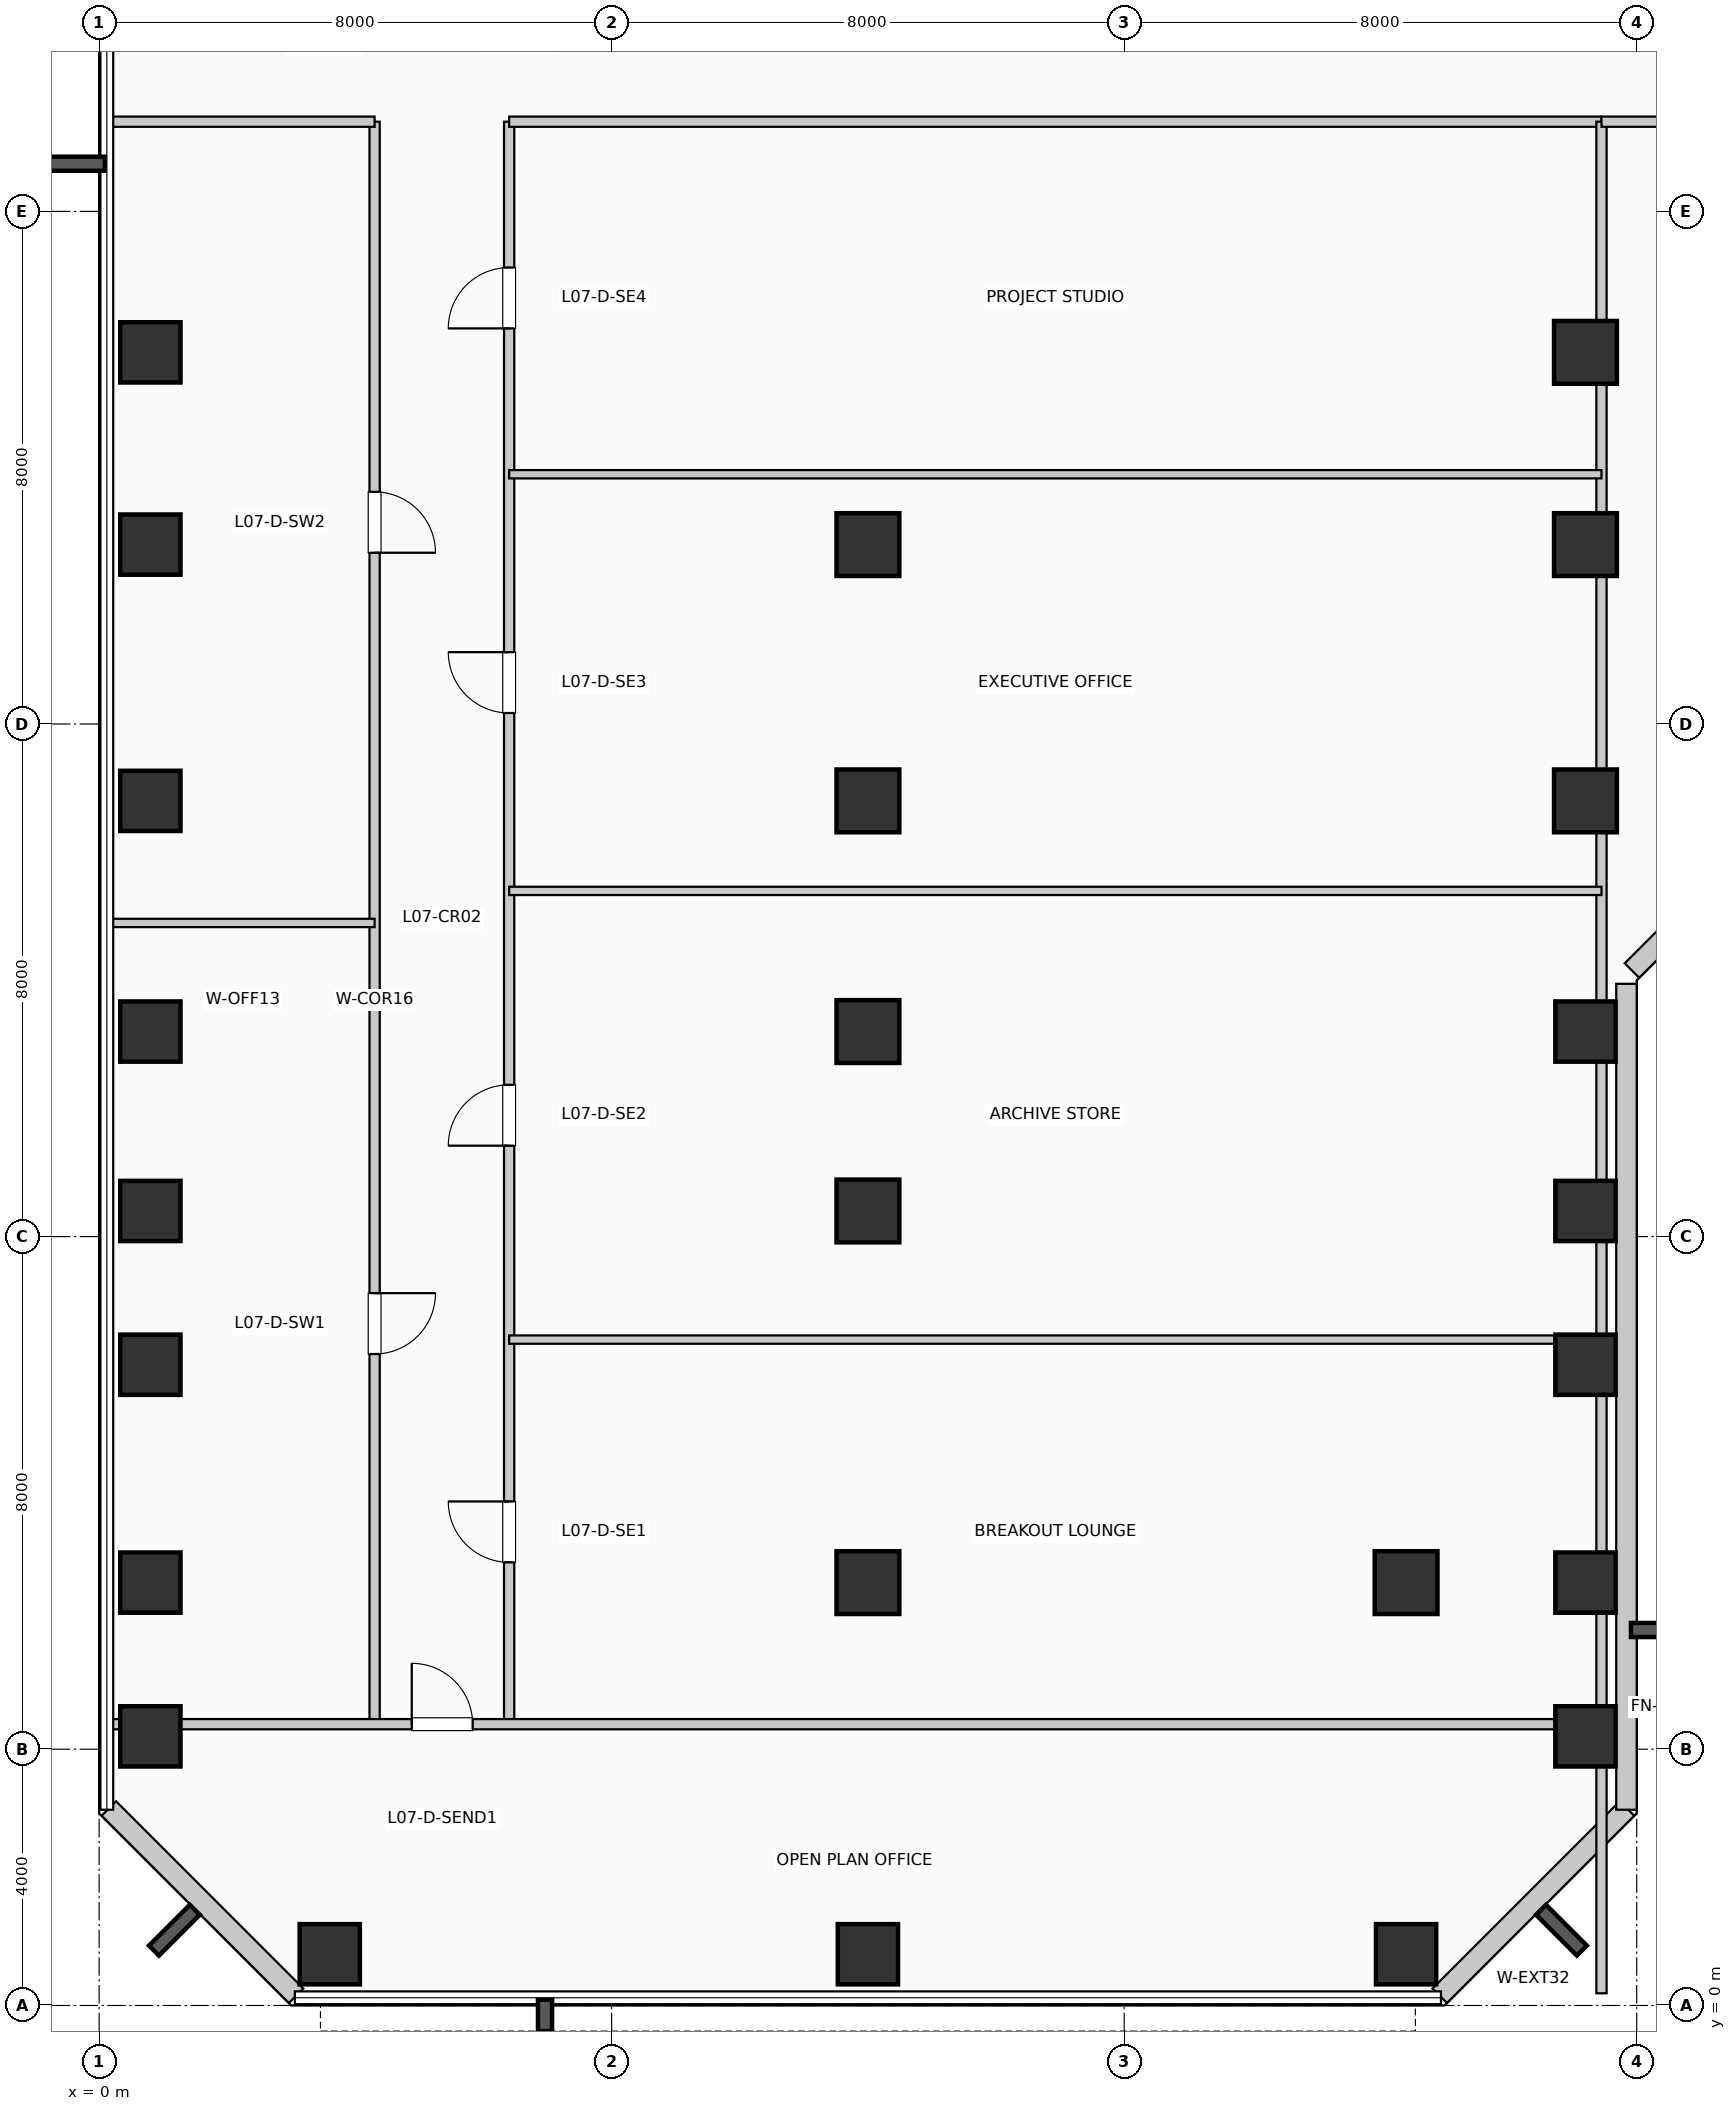
"""IFC4 building model, lengths in metres.
Left out: names, types, materials, properties, quantities, classifications, styles, units other than length and angle.
Written with IfcOpenShell. Run it as: python <this file> out.ifc"""

import sys

from ifc_helpers import new_model, si_unit, direction, frame, frame_2d, origin, origin_2d, place, context, subcontext, project, spatial, rectangle, extrude, element, fill, save


model = new_model("IFC4")
c1 = context("Model", 3, precision=1e-05, world=origin(), true_north=direction((0.0, 1.0)))
c2 = subcontext(c1, "Body", "Model", "MODEL_VIEW")
j1 = project(units=[si_unit("LENGTHUNIT", "METRE"), si_unit("PLANEANGLEUNIT", "RADIAN")], contexts=[c1])
p1 = place(None, origin())
s1 = spatial("IfcSite", under=j1, at=p1, CompositionType="ELEMENT")
p2 = place(p1, origin())
s2 = spatial("IfcBuilding", under=s1, at=p2, CompositionType="ELEMENT")
p3 = place(p2, frame((0.0, 0.0, 34.32)))
s3 = spatial("IfcBuildingStorey", under=s2, at=p3, CompositionType="ELEMENT", Elevation=34.32)
for number, where, z_axis, x_axis in (
    (1, (0.8, 4.2, 0.0), (0.0, 0.0, 1.0), (1.0, 0.0, 0.0)),
    (2, (0.8, 6.6, 0.0), (0.0, 0.0, 1.0), (1.0, 0.0, 0.0)),
    (3, (0.8, 10.0, 0.0), (0.0, 0.0, 1.0), (1.0, 0.0, 0.0)),
    (4, (0.8, 12.4, 0.0), (0.0, 0.0, 1.0), (1.0, 0.0, 0.0)),
    (5, (0.8, 15.2, 0.0), (0.0, 0.0, 1.0), (1.0, 0.0, 0.0)),
    (6, (0.8, 18.8, 0.0), (0.0, 0.0, 1.0), (1.0, 0.0, 0.0)),
    (7, (0.8, 22.8, 0.0), (0.0, 0.0, 1.0), (1.0, 0.0, 0.0)),
    (8, (0.8, 25.8, 0.0), (0.0, 0.0, 1.0), (1.0, 0.0, 0.0)),
    (9, (3.6, 0.8, 0.0), (0.0, 0.0, 1.0), (1.0, 0.0, 0.0)),
    (10, (12.0, 0.8, 0.0), (0.0, 0.0, 1.0), (1.0, 0.0, 0.0)),
):
    element("IfcColumn", number, at=place(p3, frame(where, z_axis=z_axis, x_axis=x_axis)), inside=s3, PredefinedType="COLUMN", context=c2, shape_type="SweptSolid", body=[
        extrude(rectangle(XDim=0.94, YDim=0.94, at=origin_2d()), origin(), (0.0, 0.0, 1.0), 3.96),
    ])
for number, where, z_axis, x_axis in (
    (11, (12.0, 6.6, 0.0), (0.0, 0.0, 1.0), (1.0, 0.0, 0.0)),
    (12, (12.0, 12.4, 0.0), (0.0, 0.0, 1.0), (1.0, 0.0, 0.0)),
    (13, (12.0, 15.2, 0.0), (0.0, 0.0, 1.0), (1.0, 0.0, 0.0)),
    (14, (12.0, 18.8, 0.0), (0.0, 0.0, 1.0), (1.0, 0.0, 0.0)),
    (15, (12.0, 22.8, 0.0), (0.0, 0.0, 1.0), (1.0, 0.0, 0.0)),
):
    element("IfcColumn", number, at=place(p3, frame(where, z_axis=z_axis, x_axis=x_axis)), inside=s3, PredefinedType="COLUMN", context=c2, shape_type="SweptSolid", body=[
        extrude(rectangle(XDim=0.98, YDim=0.98, at=origin_2d()), origin(), (0.0, 0.0, 1.0), 3.96),
    ])
p4 = place(p3, frame((20.4, 0.8, 0.0), z_axis=(0.0, 0.0, 1.0), x_axis=(1.0, 0.0, 0.0)))
e16 = element("IfcColumn", 16, at=p4, inside=s3, PredefinedType="COLUMN", context=c2, shape_type="SweptSolid", body=[
    extrude(rectangle(XDim=0.94, YDim=0.94, at=origin_2d()), origin(), (0.0, 0.0, 1.0), 3.96),
])
p5 = place(p3, frame((20.4, 6.6, 0.0), z_axis=(0.0, 0.0, 1.0), x_axis=(1.0, 0.0, 0.0)))
e17 = element("IfcColumn", 17, at=p5, inside=s3, PredefinedType="COLUMN", context=c2, shape_type="SweptSolid", body=[
    extrude(rectangle(XDim=0.98, YDim=0.98, at=origin_2d()), origin(), (0.0, 0.0, 1.0), 3.96),
])
for number, where, z_axis, x_axis in (
    (18, (23.2, 4.2, 0.0), (0.0, 0.0, 1.0), (1.0, 0.0, 0.0)),
    (19, (23.2, 6.6, 0.0), (0.0, 0.0, 1.0), (1.0, 0.0, 0.0)),
    (20, (23.2, 10.0, 0.0), (0.0, 0.0, 1.0), (1.0, 0.0, 0.0)),
    (21, (23.2, 12.4, 0.0), (0.0, 0.0, 1.0), (1.0, 0.0, 0.0)),
    (22, (23.2, 15.2, 0.0), (0.0, 0.0, 1.0), (1.0, 0.0, 0.0)),
):
    element("IfcColumn", number, at=place(p3, frame(where, z_axis=z_axis, x_axis=x_axis)), inside=s3, PredefinedType="COLUMN", context=c2, shape_type="SweptSolid", body=[
        extrude(rectangle(XDim=0.94, YDim=0.94, at=origin_2d()), origin(), (0.0, 0.0, 1.0), 3.96),
    ])
for number, where, z_axis, x_axis in (
    (23, (23.2, 18.8, 0.0), (0.0, 0.0, 1.0), (1.0, 0.0, 0.0)),
    (24, (23.2, 22.8, 0.0), (0.0, 0.0, 1.0), (1.0, 0.0, 0.0)),
    (25, (23.2, 25.8, 0.0), (0.0, 0.0, 1.0), (1.0, 0.0, 0.0)),
):
    element("IfcColumn", number, at=place(p3, frame(where, z_axis=z_axis, x_axis=x_axis)), inside=s3, PredefinedType="COLUMN", context=c2, shape_type="SweptSolid", body=[
        extrude(rectangle(XDim=0.98, YDim=0.98, at=origin_2d()), origin(), (0.0, 0.0, 1.0), 3.96),
    ])
p6 = place(p3, frame((20.926, 0.152, 0.0), z_axis=(0.0, 0.0, 1.0), x_axis=(0.707106781187, 0.707106781187, 0.0)))
e26 = element("IfcWall", 26, at=p6, inside=s3, PredefinedType="SOLIDWALL", context=c2, shape_type="SweptSolid", body=[
    extrude(rectangle(XDim=4.133, YDim=0.32, at=frame_2d((2.066, 0.0))), origin(), (0.0, 0.0, 1.0), 3.71),
])
p7 = place(p3, frame((23.84, 3.055, 0.0), z_axis=(0.0, 0.0, 1.0), x_axis=(0.0, 1.0, 0.0)))
e27 = element("IfcWall", 27, at=p7, inside=s3, PredefinedType="SOLIDWALL", context=c2, shape_type="SweptSolid", body=[
    extrude(rectangle(XDim=12.89, YDim=0.32, at=frame_2d((6.445, 0.0))), origin(), (0.0, 0.0, 1.0), 3.71),
])
p8 = place(p3, frame((23.926, 16.152, 0.0), z_axis=(0.0, 0.0, 1.0), x_axis=(0.707106781187, 0.707106781187, 0.0)))
e28 = element("IfcWall", 28, at=p8, inside=s3, PredefinedType="SOLIDWALL", context=c2, shape_type="SweptSolid", body=[
    extrude(rectangle(XDim=2.718, YDim=0.32, at=frame_2d((1.359, 0.0))), origin(), (0.0, 0.0, 1.0), 3.71),
])
p9 = place(p3, frame((0.152, 3.074, 0.0), z_axis=(0.0, 0.0, 1.0), x_axis=(0.707106781187, -0.707106781187, 0.0)))
e29 = element("IfcWall", 29, at=p9, inside=s3, PredefinedType="SOLIDWALL", context=c2, shape_type="SweptSolid", body=[
    extrude(rectangle(XDim=4.133, YDim=0.32, at=frame_2d((2.066, 0.0))), origin(), (0.0, 0.0, 1.0), 3.71),
])
p10 = place(p3, frame((4.3, 4.39, 0.0), z_axis=(0.0, 0.0, 1.0), x_axis=(0.0, 1.0, 0.0)))
e30 = element("IfcWall", 30, at=p10, inside=s3, PredefinedType="PARTITIONING", context=c2, shape_type="SweptSolid", body=[
    extrude(rectangle(XDim=25.01, YDim=0.16, at=frame_2d((12.505, 0.0))), origin(), (0.0, 0.0, 1.0), 3.71),
])
p11 = place(p10, frame((6.728, 0.0, 0.0), z_axis=(0.0, 0.0, 1.0), x_axis=(-1.0, 0.0, 0.0)))
e31 = element("IfcOpeningElement", 31, at=p11, cuts=e30, PredefinedType="OPENING", context=c2, shape_type="SweptSolid", body=[
    extrude(rectangle(XDim=0.95, YDim=2.15, at=frame_2d((0.475, 1.075))), frame((0.0, 0.09, 0.0), z_axis=(0.0, -1.0, 0.0), x_axis=(1.0, 0.0, 0.0)), (0.0, 0.0, 1.0), 0.18),
])
p12 = place(p10, frame((19.232, 0.0, 0.0), z_axis=(0.0, 0.0, 1.0), x_axis=(-1.0, 0.0, 0.0)))
e32 = element("IfcOpeningElement", 32, at=p12, cuts=e30, PredefinedType="OPENING", context=c2, shape_type="SweptSolid", body=[
    extrude(rectangle(XDim=0.95, YDim=2.15, at=frame_2d((0.475, 1.075))), frame((0.0, 0.09, 0.0), z_axis=(0.0, -1.0, 0.0), x_axis=(1.0, 0.0, 0.0)), (0.0, 0.0, 1.0), 0.18),
])
p13 = place(p3, frame((6.4, 4.39, 0.0), z_axis=(0.0, 0.0, 1.0), x_axis=(0.0, 1.0, 0.0)))
e33 = element("IfcWall", 33, at=p13, inside=s3, PredefinedType="PARTITIONING", context=c2, shape_type="SweptSolid", body=[
    extrude(rectangle(XDim=25.01, YDim=0.16, at=frame_2d((12.505, 0.0))), origin(), (0.0, 0.0, 1.0), 3.71),
])
p14 = place(p13, frame((2.526, 0.0, 0.0)))
e34 = element("IfcOpeningElement", 34, at=p14, cuts=e33, PredefinedType="OPENING", context=c2, shape_type="SweptSolid", body=[
    extrude(rectangle(XDim=0.95, YDim=2.15, at=frame_2d((0.475, 1.075))), frame((0.0, 0.09, 0.0), z_axis=(0.0, -1.0, 0.0), x_axis=(1.0, 0.0, 0.0)), (0.0, 0.0, 1.0), 0.18),
])
p15 = place(p13, frame((9.029, 0.0, 0.0)))
e35 = element("IfcOpeningElement", 35, at=p15, cuts=e33, PredefinedType="OPENING", context=c2, shape_type="SweptSolid", body=[
    extrude(rectangle(XDim=0.95, YDim=2.15, at=frame_2d((0.475, 1.075))), frame((0.0, 0.09, 0.0), z_axis=(0.0, -1.0, 0.0), x_axis=(1.0, 0.0, 0.0)), (0.0, 0.0, 1.0), 0.18),
])
p16 = place(p13, frame((15.781, 0.0, 0.0)))
e36 = element("IfcOpeningElement", 36, at=p16, cuts=e33, PredefinedType="OPENING", context=c2, shape_type="SweptSolid", body=[
    extrude(rectangle(XDim=0.95, YDim=2.15, at=frame_2d((0.475, 1.075))), frame((0.0, 0.09, 0.0), z_axis=(0.0, -1.0, 0.0), x_axis=(1.0, 0.0, 0.0)), (0.0, 0.0, 1.0), 0.18),
])
p17 = place(p13, frame((21.784, 0.0, 0.0)))
e37 = element("IfcOpeningElement", 37, at=p17, cuts=e33, PredefinedType="OPENING", context=c2, shape_type="SweptSolid", body=[
    extrude(rectangle(XDim=0.95, YDim=2.15, at=frame_2d((0.475, 1.075))), frame((0.0, 0.09, 0.0), z_axis=(0.0, -1.0, 0.0), x_axis=(1.0, 0.0, 0.0)), (0.0, 0.0, 1.0), 0.18),
])
p18 = place(p3, frame((0.19, 4.39, 0.0), z_axis=(0.0, 0.0, 1.0), x_axis=(1.0, 0.0, 0.0)))
e38 = element("IfcWall", 38, at=p18, inside=s3, PredefinedType="PARTITIONING", context=c2, shape_type="SweptSolid", body=[
    extrude(rectangle(XDim=23.26, YDim=0.16, at=frame_2d((11.63, 0.0))), origin(), (0.0, 0.0, 1.0), 2.995),
])
p19 = place(p18, frame((4.69, 0.0, 0.0)))
e39 = element("IfcOpeningElement", 39, at=p19, cuts=e38, PredefinedType="OPENING", context=c2, shape_type="SweptSolid", body=[
    extrude(rectangle(XDim=0.95, YDim=2.15, at=frame_2d((0.475, 1.075))), frame((0.0, 0.09, 0.0), z_axis=(0.0, -1.0, 0.0), x_axis=(1.0, 0.0, 0.0)), (0.0, 0.0, 1.0), 0.18),
])
p20 = place(p3, frame((0.19, 29.4, 0.0), z_axis=(0.0, 0.0, 1.0), x_axis=(1.0, 0.0, 0.0)))
e40 = element("IfcWall", 40, at=p20, inside=s3, PredefinedType="PARTITIONING", context=c2, shape_type="SweptSolid", body=[
    extrude(rectangle(XDim=4.11, YDim=0.16, at=frame_2d((2.055, 0.0))), origin(), (0.0, 0.0, 1.0), 3.365),
])
p21 = place(p3, frame((6.4, 29.4, 0.0), z_axis=(0.0, 0.0, 1.0), x_axis=(1.0, 0.0, 0.0)))
e41 = element("IfcWall", 41, at=p21, inside=s3, PredefinedType="PARTITIONING", context=c2, shape_type="SweptSolid", body=[
    extrude(rectangle(XDim=17.05, YDim=0.16, at=frame_2d((8.525, 0.0))), origin(), (0.0, 0.0, 1.0), 3.365),
])
p22 = place(p3, frame((23.45, 0.19, 0.0), z_axis=(0.0, 0.0, 1.0), x_axis=(0.0, 1.0, 0.0)))
e42 = element("IfcWall", 42, at=p22, inside=s3, PredefinedType="PARTITIONING", context=c2, shape_type="SweptSolid", body=[
    extrude(rectangle(XDim=29.21, YDim=0.16, at=frame_2d((14.605, 0.0))), origin(), (0.0, 0.0, 1.0), 2.995),
])
p23 = place(p3, frame((0.19, 16.895, 0.0), z_axis=(0.0, 0.0, 1.0), x_axis=(1.0, 0.0, 0.0)))
e43 = element("IfcWall", 43, at=p23, inside=s3, PredefinedType="PARTITIONING", context=c2, shape_type="SweptSolid", body=[
    extrude(rectangle(XDim=4.11, YDim=0.13, at=frame_2d((2.055, 0.0))), origin(), (0.0, 0.0, 1.0), 3.71),
])
p24 = place(p3, frame((6.4, 10.392, 0.0), z_axis=(0.0, 0.0, 1.0), x_axis=(1.0, 0.0, 0.0)))
e44 = element("IfcWall", 44, at=p24, inside=s3, PredefinedType="PARTITIONING", context=c2, shape_type="SweptSolid", body=[
    extrude(rectangle(XDim=17.05, YDim=0.13, at=frame_2d((8.525, 0.0))), origin(), (0.0, 0.0, 1.0), 2.995),
])
for number, where, z_axis, x_axis in (
    (45, (6.4, 17.395, 0.0), (0.0, 0.0, 1.0), (1.0, 0.0, 0.0)),
    (46, (6.4, 23.898, 0.0), (0.0, 0.0, 1.0), (1.0, 0.0, 0.0)),
):
    element("IfcWall", number, at=place(p3, frame(where, z_axis=z_axis, x_axis=x_axis)), inside=s3, PredefinedType="PARTITIONING", context=c2, shape_type="SweptSolid", body=[
        extrude(rectangle(XDim=17.05, YDim=0.13, at=frame_2d((8.525, 0.0))), origin(), (0.0, 0.0, 1.0), 3.71),
    ])
p25 = place(p3, frame((23.45, 29.4, 0.0), z_axis=(0.0, 0.0, 1.0), x_axis=(1.0, 0.0, 0.0)))
e47 = element("IfcWall", 47, at=p25, inside=s3, PredefinedType="PARTITIONING", context=c2, shape_type="SweptSolid", body=[
    extrude(rectangle(XDim=32.36, YDim=0.16, at=frame_2d((16.18, 0.0))), origin(), (0.0, 0.0, 1.0), 3.365),
])
p26 = place(p25, frame((5.976, 0.0, 0.0), z_axis=(0.0, 0.0, 1.0), x_axis=(-1.0, 0.0, 0.0)))
e48 = element("IfcOpeningElement", 48, at=p26, cuts=e47, PredefinedType="OPENING", context=c2, shape_type="SweptSolid", body=[
    extrude(rectangle(XDim=0.95, YDim=2.15, at=frame_2d((0.475, 1.075))), frame((0.0, 0.09, 0.0), z_axis=(0.0, -1.0, 0.0), x_axis=(1.0, 0.0, 0.0)), (0.0, 0.0, 1.0), 0.18),
])
p27 = place(p25, frame((16.979, 0.0, 0.0), z_axis=(0.0, 0.0, 1.0), x_axis=(-1.0, 0.0, 0.0)))
e49 = element("IfcOpeningElement", 49, at=p27, cuts=e47, PredefinedType="OPENING", context=c2, shape_type="SweptSolid", body=[
    extrude(rectangle(XDim=0.95, YDim=2.15, at=frame_2d((0.475, 1.075))), frame((0.0, 0.09, 0.0), z_axis=(0.0, -1.0, 0.0), x_axis=(1.0, 0.0, 0.0)), (0.0, 0.0, 1.0), 0.18),
])
p28 = place(p25, frame((27.657, 0.0, 0.0), z_axis=(0.0, 0.0, 1.0), x_axis=(-1.0, 0.0, 0.0)))
e50 = element("IfcOpeningElement", 50, at=p28, cuts=e47, PredefinedType="OPENING", context=c2, shape_type="SweptSolid", body=[
    extrude(rectangle(XDim=0.95, YDim=2.15, at=frame_2d((0.475, 1.075))), frame((0.0, 0.09, 0.0), z_axis=(0.0, -1.0, 0.0), x_axis=(1.0, 0.0, 0.0)), (0.0, 0.0, 1.0), 0.18),
])
p29 = place(p19, origin())
e51 = element("IfcDoor", 51, at=p29, inside=s3, OperationType="SINGLE_SWING_LEFT", PredefinedType="DOOR", context=c2, shape_type="SweptSolid", body=[
    extrude(rectangle(XDim=0.95, YDim=2.15, at=frame_2d((0.475, 1.075))), frame((0.0, 0.025, 0.0), z_axis=(0.0, -1.0, 0.0), x_axis=(1.0, 0.0, 0.0)), (0.0, 0.0, 1.0), 0.05),
])
fill(e39, e51)
p30 = place(p11, origin())
e52 = element("IfcDoor", 52, at=p30, inside=s3, OperationType="SINGLE_SWING_RIGHT", PredefinedType="DOOR", context=c2, shape_type="SweptSolid", body=[
    extrude(rectangle(XDim=0.95, YDim=2.15, at=frame_2d((0.475, 1.075))), frame((0.0, 0.025, 0.0), z_axis=(0.0, -1.0, 0.0), x_axis=(1.0, 0.0, 0.0)), (0.0, 0.0, 1.0), 0.05),
])
fill(e31, e52)
p31 = place(p12, origin())
e53 = element("IfcDoor", 53, at=p31, inside=s3, OperationType="SINGLE_SWING_LEFT", PredefinedType="DOOR", context=c2, shape_type="SweptSolid", body=[
    extrude(rectangle(XDim=0.95, YDim=2.15, at=frame_2d((0.475, 1.075))), frame((0.0, 0.025, 0.0), z_axis=(0.0, -1.0, 0.0), x_axis=(1.0, 0.0, 0.0)), (0.0, 0.0, 1.0), 0.05),
])
fill(e32, e53)
p32 = place(p14, origin())
e54 = element("IfcDoor", 54, at=p32, inside=s3, OperationType="SINGLE_SWING_RIGHT", PredefinedType="DOOR", context=c2, shape_type="SweptSolid", body=[
    extrude(rectangle(XDim=0.95, YDim=2.15, at=frame_2d((0.475, 1.075))), frame((0.0, 0.025, 0.0), z_axis=(0.0, -1.0, 0.0), x_axis=(1.0, 0.0, 0.0)), (0.0, 0.0, 1.0), 0.05),
])
fill(e34, e54)
p33 = place(p15, origin())
e55 = element("IfcDoor", 55, at=p33, inside=s3, OperationType="SINGLE_SWING_LEFT", PredefinedType="DOOR", context=c2, shape_type="SweptSolid", body=[
    extrude(rectangle(XDim=0.95, YDim=2.15, at=frame_2d((0.475, 1.075))), frame((0.0, 0.025, 0.0), z_axis=(0.0, -1.0, 0.0), x_axis=(1.0, 0.0, 0.0)), (0.0, 0.0, 1.0), 0.05),
])
fill(e35, e55)
p34 = place(p16, origin())
e56 = element("IfcDoor", 56, at=p34, inside=s3, OperationType="SINGLE_SWING_RIGHT", PredefinedType="DOOR", context=c2, shape_type="SweptSolid", body=[
    extrude(rectangle(XDim=0.95, YDim=2.15, at=frame_2d((0.475, 1.075))), frame((0.0, 0.025, 0.0), z_axis=(0.0, -1.0, 0.0), x_axis=(1.0, 0.0, 0.0)), (0.0, 0.0, 1.0), 0.05),
])
fill(e36, e56)
p35 = place(p17, origin())
e57 = element("IfcDoor", 57, at=p35, inside=s3, OperationType="SINGLE_SWING_LEFT", PredefinedType="DOOR", context=c2, shape_type="SweptSolid", body=[
    extrude(rectangle(XDim=0.95, YDim=2.15, at=frame_2d((0.475, 1.075))), frame((0.0, 0.025, 0.0), z_axis=(0.0, -1.0, 0.0), x_axis=(1.0, 0.0, 0.0)), (0.0, 0.0, 1.0), 0.05),
])
fill(e37, e57)
save(model, sys.argv[1])
